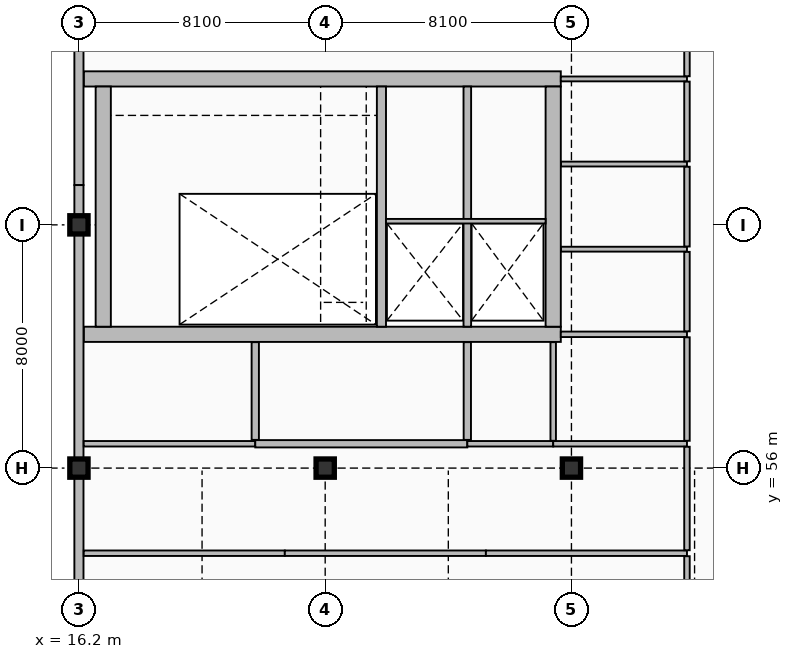
"""IFC4 building model, lengths in metres.
Left out: names, types, materials, properties, quantities, classifications, styles, units other than length and angle.
Written with IfcOpenShell. Run it as: python <this file> out.ifc"""

import sys

from ifc_helpers import new_model, si_unit, direction, frame, frame_2d, origin, origin_2d, place, context, subcontext, project, spatial, rectangle, extrude, element, fill, save


model = new_model("IFC4")
c1 = context("Model", 3, precision=1e-05, world=origin(), true_north=direction((0.0, 1.0)))
c2 = subcontext(c1, "Body", "Model", "MODEL_VIEW")
j1 = project(units=[si_unit("LENGTHUNIT", "METRE"), si_unit("PLANEANGLEUNIT", "RADIAN")], contexts=[c1])
p1 = place(None, origin())
s1 = spatial("IfcSite", under=j1, at=p1, CompositionType="ELEMENT")
p2 = place(p1, origin())
s2 = spatial("IfcBuilding", under=s1, at=p2, CompositionType="ELEMENT")
p3 = place(p2, frame((0.0, 0.0, 19.8)))
s3 = spatial("IfcBuildingStorey", under=s2, at=p3, CompositionType="ELEMENT", Elevation=19.8)
p4 = place(p3, frame((16.36, 60.4, 0.0), z_axis=(0.0, 0.0, 1.0), x_axis=(1.0, 0.0, 0.0)))
e1 = element("IfcWall", 1, at=p4, inside=s3, PredefinedType="SHEAR", context=c2, shape_type="SweptSolid", body=[
    extrude(rectangle(XDim=15.69, YDim=0.5, at=frame_2d((7.845, 0.0))), origin(), (0.0, 0.0, 1.0), 5.1),
])
p5 = place(p4, frame((1.39, 0.0, 0.0)))
e2 = element("IfcOpeningElement", 2, at=p5, cuts=e1, PredefinedType="OPENING", context=c2, shape_type="SweptSolid", body=[
    extrude(rectangle(XDim=1.15, YDim=2.25, at=frame_2d((0.575, 1.125))), frame((0.0, 0.26, 0.0), z_axis=(0.0, -1.0, 0.0), x_axis=(1.0, 0.0, 0.0)), (0.0, 0.0, 1.0), 0.52),
])
p6 = place(p4, frame((10.673, 0.0, 0.0)))
e3 = element("IfcOpeningElement", 3, at=p6, cuts=e1, PredefinedType="OPENING", context=c2, shape_type="SweptSolid", body=[
    extrude(rectangle(XDim=1.1, YDim=2.2, at=frame_2d((0.55, 1.1))), frame((0.0, 0.26, 0.0), z_axis=(0.0, -1.0, 0.0), x_axis=(1.0, 0.0, 0.0)), (0.0, 0.0, 1.0), 0.52),
])
p7 = place(p4, frame((13.387, 0.0, 0.0)))
e4 = element("IfcOpeningElement", 4, at=p7, cuts=e1, PredefinedType="OPENING", context=c2, shape_type="SweptSolid", body=[
    extrude(rectangle(XDim=1.1, YDim=2.2, at=frame_2d((0.55, 1.1))), frame((0.0, 0.26, 0.0), z_axis=(0.0, -1.0, 0.0), x_axis=(1.0, 0.0, 0.0)), (0.0, 0.0, 1.0), 0.52),
])
p8 = place(p3, frame((16.36, 68.8, 0.0), z_axis=(0.0, 0.0, 1.0), x_axis=(1.0, 0.0, 0.0)))
e5 = element("IfcWall", 5, at=p8, inside=s3, PredefinedType="SHEAR", context=c2, shape_type="SweptSolid", body=[
    extrude(rectangle(XDim=15.69, YDim=0.5, at=frame_2d((7.845, 0.0))), origin(), (0.0, 0.0, 1.0), 5.1),
])
for number, where, z_axis, x_axis in (
    (6, (17.0, 60.65, 0.0), (0.0, 0.0, 1.0), (0.0, 1.0, 0.0)),
    (7, (31.8, 60.65, 0.0), (0.0, 0.0, 1.0), (0.0, 1.0, 0.0)),
):
    element("IfcWall", number, at=place(p3, frame(where, z_axis=z_axis, x_axis=x_axis)), inside=s3, PredefinedType="SHEAR", context=c2, shape_type="SweptSolid", body=[
        extrude(rectangle(XDim=7.9, YDim=0.5, at=frame_2d((3.95, 0.0))), origin(), (0.0, 0.0, 1.0), 5.1),
    ])
p9 = place(p3, frame((26.15, 60.65, 0.0), z_axis=(0.0, 0.0, 1.0), x_axis=(0.0, 1.0, 0.0)))
e8 = element("IfcWall", 8, at=p9, inside=s3, PredefinedType="SHEAR", context=c2, shape_type="SweptSolid", body=[
    extrude(rectangle(XDim=7.9, YDim=0.3, at=frame_2d((3.95, 0.0))), origin(), (0.0, 0.0, 1.0), 5.1),
])
p10 = place(p3, frame((28.975, 60.65, 0.0), z_axis=(0.0, 0.0, 1.0), x_axis=(0.0, 1.0, 0.0)))
e9 = element("IfcWall", 9, at=p10, inside=s3, PredefinedType="SHEAR", context=c2, shape_type="SweptSolid", body=[
    extrude(rectangle(XDim=7.9, YDim=0.25, at=frame_2d((3.95, 0.0))), origin(), (0.0, 0.0, 1.0), 5.1),
])
for number, where, z_axis, x_axis in (
    (10, (16.2, 56.0, 0.0), (0.0, 0.0, 1.0), (1.0, 0.0, 0.0)),
    (11, (16.2, 64.0, 0.0), (0.0, 0.0, 1.0), (1.0, 0.0, 0.0)),
    (12, (24.3, 56.0, 0.0), (0.0, 0.0, 1.0), (1.0, 0.0, 0.0)),
    (13, (32.4, 56.0, 0.0), (0.0, 0.0, 1.0), (1.0, 0.0, 0.0)),
):
    element("IfcColumn", number, at=place(p3, frame(where, z_axis=z_axis, x_axis=x_axis)), inside=s3, PredefinedType="COLUMN", context=c2, shape_type="SweptSolid", body=[
        extrude(rectangle(XDim=0.6, YDim=0.6, at=origin_2d()), origin(), (0.0, 0.0, 1.0), 5.1),
    ])
p11 = place(p3, frame((16.2, 80.872, 0.0), z_axis=(0.0, 0.0, 1.0), x_axis=(0.0, -1.0, 0.0)))
e14 = element("IfcWall", 14, at=p11, inside=s3, PredefinedType="SOLIDWALL", context=c2, shape_type="SweptSolid", body=[
    extrude(rectangle(XDim=15.564, YDim=0.3, at=frame_2d((7.782, 0.0))), origin(), (0.0, 0.0, 1.0), 4.352),
])
p12 = place(p11, frame((4.5, 0.0, 0.85)))
e15 = element("IfcOpeningElement", 15, at=p12, cuts=e14, PredefinedType="OPENING", context=c2, shape_type="SweptSolid", body=[
    extrude(rectangle(XDim=1.35, YDim=2.1, at=frame_2d((0.675, 1.05))), frame((0.0, 0.16, 0.0), z_axis=(0.0, -1.0, 0.0), x_axis=(1.0, 0.0, 0.0)), (0.0, 0.0, 1.0), 0.32),
])
p13 = place(p3, frame((16.2, 65.308, 0.0), z_axis=(0.0, 0.0, 1.0), x_axis=(0.0, -1.0, 0.0)))
e16 = element("IfcWall", 16, at=p13, inside=s3, PredefinedType="SOLIDWALL", context=c2, shape_type="SweptSolid", body=[
    extrude(rectangle(XDim=15.564, YDim=0.3, at=frame_2d((7.782, 0.0))), origin(), (0.0, 0.0, 1.0), 4.289),
])
p14 = place(p3, frame((26.3, 64.12, 0.0), z_axis=(0.0, 0.0, 1.0), x_axis=(1.0, 0.0, 0.0)))
e17 = element("IfcWall", 17, at=p14, inside=s3, PredefinedType="PARTITIONING", context=c2, shape_type="SweptSolid", body=[
    extrude(rectangle(XDim=5.25, YDim=0.15, at=frame_2d((2.625, 0.0))), origin(), (0.0, 0.0, 1.0), 4.86),
])
for number, where, z_axis, x_axis in (
    (18, (16.358, 53.2, 0.0), (0.0, 0.0, 1.0), (1.0, 0.0, 0.0)),
    (19, (22.972, 53.2, 0.0), (0.0, 0.0, 1.0), (1.0, 0.0, 0.0)),
    (20, (29.586, 53.2, 0.0), (0.0, 0.0, 1.0), (1.0, 0.0, 0.0)),
):
    element("IfcWall", number, at=place(p3, frame(where, z_axis=z_axis, x_axis=x_axis)), inside=s3, PredefinedType="PARTITIONING", context=c2, shape_type="SweptSolid", body=[
        extrude(rectangle(XDim=6.614, YDim=0.18, at=frame_2d((3.307, 0.0))), origin(), (0.0, 0.0, 1.0), 4.86),
    ])
p15 = place(p3, frame((16.358, 56.8, 0.0), z_axis=(0.0, 0.0, 1.0), x_axis=(1.0, 0.0, 0.0)))
e21 = element("IfcWall", 21, at=p15, inside=s3, PredefinedType="PARTITIONING", context=c2, shape_type="SweptSolid", body=[
    extrude(rectangle(XDim=5.642, YDim=0.18, at=frame_2d((2.821, 0.0))), origin(), (0.0, 0.0, 1.0), 4.86),
])
p16 = place(p15, frame((2.271, 0.0, 0.0)))
e22 = element("IfcOpeningElement", 22, at=p16, cuts=e21, PredefinedType="OPENING", context=c2, shape_type="SweptSolid", body=[
    extrude(rectangle(XDim=1.1, YDim=2.2, at=frame_2d((0.55, 1.1))), frame((0.0, 0.1, 0.0), z_axis=(0.0, -1.0, 0.0), x_axis=(1.0, 0.0, 0.0)), (0.0, 0.0, 1.0), 0.2),
])
p17 = place(p3, frame((22.0, 56.8, 0.0), z_axis=(0.0, 0.0, 1.0), x_axis=(1.0, 0.0, 0.0)))
e23 = element("IfcWall", 23, at=p17, inside=s3, PredefinedType="PARTITIONING", context=c2, shape_type="SweptSolid", body=[
    extrude(rectangle(XDim=6.975, YDim=0.24, at=frame_2d((3.488, 0.0))), origin(), (0.0, 0.0, 1.0), 4.86),
])
p18 = place(p17, frame((4.003, 0.0, 0.0)))
e24 = element("IfcOpeningElement", 24, at=p18, cuts=e23, PredefinedType="OPENING", context=c2, shape_type="SweptSolid", body=[
    extrude(rectangle(XDim=1.2, YDim=2.3, at=frame_2d((0.6, 1.15))), frame((0.0, 0.13, 0.0), z_axis=(0.0, -1.0, 0.0), x_axis=(1.0, 0.0, 0.0)), (0.0, 0.0, 1.0), 0.26),
])
p19 = place(p3, frame((28.975, 56.8, 0.0), z_axis=(0.0, 0.0, 1.0), x_axis=(1.0, 0.0, 0.0)))
e25 = element("IfcWall", 25, at=p19, inside=s3, PredefinedType="PARTITIONING", context=c2, shape_type="SweptSolid", body=[
    extrude(rectangle(XDim=2.825, YDim=0.18, at=frame_2d((1.413, 0.0))), origin(), (0.0, 0.0, 1.0), 4.86),
])
p20 = place(p19, frame((0.636, 0.0, 0.0)))
e26 = element("IfcOpeningElement", 26, at=p20, cuts=e25, PredefinedType="OPENING", context=c2, shape_type="SweptSolid", body=[
    extrude(rectangle(XDim=1.1, YDim=2.2, at=frame_2d((0.55, 1.1))), frame((0.0, 0.1, 0.0), z_axis=(0.0, -1.0, 0.0), x_axis=(1.0, 0.0, 0.0)), (0.0, 0.0, 1.0), 0.2),
])
p21 = place(p3, frame((31.8, 56.8, 0.0), z_axis=(0.0, 0.0, 1.0), x_axis=(1.0, 0.0, 0.0)))
e27 = element("IfcWall", 27, at=p21, inside=s3, PredefinedType="PARTITIONING", context=c2, shape_type="SweptSolid", body=[
    extrude(rectangle(XDim=4.4, YDim=0.18, at=frame_2d((2.2, 0.0))), origin(), (0.0, 0.0, 1.0), 4.86),
])
p22 = place(p3, frame((32.05, 60.4, 0.0), z_axis=(0.0, 0.0, 1.0), x_axis=(1.0, 0.0, 0.0)))
e28 = element("IfcWall", 28, at=p22, inside=s3, PredefinedType="PARTITIONING", context=c2, shape_type="SweptSolid", body=[
    extrude(rectangle(XDim=4.15, YDim=0.18, at=frame_2d((2.075, 0.0))), origin(), (0.0, 0.0, 1.0), 4.86),
])
for number, where, z_axis, x_axis in (
    (29, (32.058, 63.2, 0.0), (0.0, 0.0, 1.0), (1.0, 0.0, 0.0)),
    (30, (32.058, 66.0, 0.0), (0.0, 0.0, 1.0), (1.0, 0.0, 0.0)),
):
    element("IfcWall", number, at=place(p3, frame(where, z_axis=z_axis, x_axis=x_axis)), inside=s3, PredefinedType="PARTITIONING", context=c2, shape_type="SweptSolid", body=[
        extrude(rectangle(XDim=4.142, YDim=0.16, at=frame_2d((2.071, 0.0))), origin(), (0.0, 0.0, 1.0), 4.86),
    ])
p23 = place(p3, frame((32.05, 68.8, 0.0), z_axis=(0.0, 0.0, 1.0), x_axis=(1.0, 0.0, 0.0)))
e31 = element("IfcWall", 31, at=p23, inside=s3, PredefinedType="PARTITIONING", context=c2, shape_type="SweptSolid", body=[
    extrude(rectangle(XDim=4.15, YDim=0.16, at=frame_2d((2.075, 0.0))), origin(), (0.0, 0.0, 1.0), 4.86),
])
p24 = place(p3, frame((22.0, 56.928, 0.0), z_axis=(0.0, 0.0, 1.0), x_axis=(0.0, 1.0, 0.0)))
e32 = element("IfcWall", 32, at=p24, inside=s3, PredefinedType="PARTITIONING", context=c2, shape_type="SweptSolid", body=[
    extrude(rectangle(XDim=3.214, YDim=0.24, at=frame_2d((1.607, 0.0))), origin(), (0.0, 0.0, 1.0), 4.86),
])
p25 = place(p24, frame((1.107, 0.0, 0.0)))
e33 = element("IfcOpeningElement", 33, at=p25, cuts=e32, PredefinedType="OPENING", context=c2, shape_type="SweptSolid", body=[
    extrude(rectangle(XDim=1.0, YDim=2.2, at=frame_2d((0.5, 1.1))), frame((0.0, 0.13, 0.0), z_axis=(0.0, -1.0, 0.0), x_axis=(1.0, 0.0, 0.0)), (0.0, 0.0, 1.0), 0.26),
])
p26 = place(p3, frame((28.975, 56.928, 0.0), z_axis=(0.0, 0.0, 1.0), x_axis=(0.0, 1.0, 0.0)))
e34 = element("IfcWall", 34, at=p26, inside=s3, PredefinedType="PARTITIONING", context=c2, shape_type="SweptSolid", body=[
    extrude(rectangle(XDim=3.214, YDim=0.24, at=frame_2d((1.607, 0.0))), origin(), (0.0, 0.0, 1.0), 4.86),
])
p27 = place(p3, frame((31.8, 56.898, 0.0), z_axis=(0.0, 0.0, 1.0), x_axis=(0.0, 1.0, 0.0)))
e35 = element("IfcWall", 35, at=p27, inside=s3, PredefinedType="PARTITIONING", context=c2, shape_type="SweptSolid", body=[
    extrude(rectangle(XDim=3.244, YDim=0.18, at=frame_2d((1.622, 0.0))), origin(), (0.0, 0.0, 1.0), 4.86),
])
p28 = place(p3, frame((36.2, 34.098, 0.0), z_axis=(0.0, 0.0, 1.0), x_axis=(0.0, 1.0, 0.0)))
e36 = element("IfcWall", 36, at=p28, inside=s3, PredefinedType="PARTITIONING", context=c2, shape_type="SweptSolid", body=[
    extrude(rectangle(XDim=19.004, YDim=0.18, at=frame_2d((9.502, 0.0))), origin(), (0.0, 0.0, 1.0), 4.405),
])
p29 = place(p28, frame((9.002, 0.0, 0.0)))
e37 = element("IfcOpeningElement", 37, at=p29, cuts=e36, PredefinedType="OPENING", context=c2, shape_type="SweptSolid", body=[
    extrude(rectangle(XDim=1.0, YDim=2.2, at=frame_2d((0.5, 1.1))), frame((0.0, 0.1, 0.0), z_axis=(0.0, -1.0, 0.0), x_axis=(1.0, 0.0, 0.0)), (0.0, 0.0, 1.0), 0.2),
])
p30 = place(p3, frame((36.2, 53.298, 0.0), z_axis=(0.0, 0.0, 1.0), x_axis=(0.0, 1.0, 0.0)))
e38 = element("IfcWall", 38, at=p30, inside=s3, PredefinedType="PARTITIONING", context=c2, shape_type="SweptSolid", body=[
    extrude(rectangle(XDim=3.404, YDim=0.18, at=frame_2d((1.702, 0.0))), origin(), (0.0, 0.0, 1.0), 4.405),
])
p31 = place(p30, frame((1.152, 0.0, 0.0)))
e39 = element("IfcOpeningElement", 39, at=p31, cuts=e38, PredefinedType="OPENING", context=c2, shape_type="SweptSolid", body=[
    extrude(rectangle(XDim=1.1, YDim=2.2, at=frame_2d((0.55, 1.1))), frame((0.0, 0.1, 0.0), z_axis=(0.0, -1.0, 0.0), x_axis=(1.0, 0.0, 0.0)), (0.0, 0.0, 1.0), 0.2),
])
p32 = place(p3, frame((36.2, 56.898, 0.0), z_axis=(0.0, 0.0, 1.0), x_axis=(0.0, 1.0, 0.0)))
e40 = element("IfcWall", 40, at=p32, inside=s3, PredefinedType="PARTITIONING", context=c2, shape_type="SweptSolid", body=[
    extrude(rectangle(XDim=3.404, YDim=0.18, at=frame_2d((1.702, 0.0))), origin(), (0.0, 0.0, 1.0), 4.86),
])
p33 = place(p32, frame((1.202, 0.0, 0.0)))
e41 = element("IfcOpeningElement", 41, at=p33, cuts=e40, PredefinedType="OPENING", context=c2, shape_type="SweptSolid", body=[
    extrude(rectangle(XDim=1.0, YDim=2.15, at=frame_2d((0.5, 1.075))), frame((0.0, 0.1, 0.0), z_axis=(0.0, -1.0, 0.0), x_axis=(1.0, 0.0, 0.0)), (0.0, 0.0, 1.0), 0.2),
])
p34 = place(p3, frame((36.2, 60.498, 0.0), z_axis=(0.0, 0.0, 1.0), x_axis=(0.0, 1.0, 0.0)))
e42 = element("IfcWall", 42, at=p34, inside=s3, PredefinedType="PARTITIONING", context=c2, shape_type="SweptSolid", body=[
    extrude(rectangle(XDim=2.614, YDim=0.18, at=frame_2d((1.307, 0.0))), origin(), (0.0, 0.0, 1.0), 4.86),
])
p35 = place(p34, frame((0.832, 0.0, 0.0)))
e43 = element("IfcOpeningElement", 43, at=p35, cuts=e42, PredefinedType="OPENING", context=c2, shape_type="SweptSolid", body=[
    extrude(rectangle(XDim=0.95, YDim=2.1, at=frame_2d((0.475, 1.05))), frame((0.0, 0.1, 0.0), z_axis=(0.0, -1.0, 0.0), x_axis=(1.0, 0.0, 0.0)), (0.0, 0.0, 1.0), 0.2),
])
p36 = place(p3, frame((36.2, 63.288, 0.0), z_axis=(0.0, 0.0, 1.0), x_axis=(0.0, 1.0, 0.0)))
e44 = element("IfcWall", 44, at=p36, inside=s3, PredefinedType="PARTITIONING", context=c2, shape_type="SweptSolid", body=[
    extrude(rectangle(XDim=2.624, YDim=0.18, at=frame_2d((1.312, 0.0))), origin(), (0.0, 0.0, 1.0), 4.86),
])
p37 = place(p36, frame((0.837, 0.0, 0.0)))
e45 = element("IfcOpeningElement", 45, at=p37, cuts=e44, PredefinedType="OPENING", context=c2, shape_type="SweptSolid", body=[
    extrude(rectangle(XDim=0.95, YDim=2.1, at=frame_2d((0.475, 1.05))), frame((0.0, 0.1, 0.0), z_axis=(0.0, -1.0, 0.0), x_axis=(1.0, 0.0, 0.0)), (0.0, 0.0, 1.0), 0.2),
])
p38 = place(p3, frame((36.2, 66.088, 0.0), z_axis=(0.0, 0.0, 1.0), x_axis=(0.0, 1.0, 0.0)))
e46 = element("IfcWall", 46, at=p38, inside=s3, PredefinedType="PARTITIONING", context=c2, shape_type="SweptSolid", body=[
    extrude(rectangle(XDim=2.624, YDim=0.18, at=frame_2d((1.312, 0.0))), origin(), (0.0, 0.0, 1.0), 4.86),
])
p39 = place(p38, frame((0.812, 0.0, 0.0)))
e47 = element("IfcOpeningElement", 47, at=p39, cuts=e46, PredefinedType="OPENING", context=c2, shape_type="SweptSolid", body=[
    extrude(rectangle(XDim=1.0, YDim=2.15, at=frame_2d((0.5, 1.075))), frame((0.0, 0.1, 0.0), z_axis=(0.0, -1.0, 0.0), x_axis=(1.0, 0.0, 0.0)), (0.0, 0.0, 1.0), 0.2),
])
p40 = place(p3, frame((36.2, 68.888, 0.0), z_axis=(0.0, 0.0, 1.0), x_axis=(0.0, 1.0, 0.0)))
e48 = element("IfcWall", 48, at=p40, inside=s3, PredefinedType="PARTITIONING", context=c2, shape_type="SweptSolid", body=[
    extrude(rectangle(XDim=14.034, YDim=0.18, at=frame_2d((7.017, 0.0))), origin(), (0.0, 0.0, 1.0), 4.445),
])
p41 = place(p40, frame((6.517, 0.0, 0.0)))
e49 = element("IfcOpeningElement", 49, at=p41, cuts=e48, PredefinedType="OPENING", context=c2, shape_type="SweptSolid", body=[
    extrude(rectangle(XDim=1.0, YDim=2.2, at=frame_2d((0.5, 1.1))), frame((0.0, 0.1, 0.0), z_axis=(0.0, -1.0, 0.0), x_axis=(1.0, 0.0, 0.0)), (0.0, 0.0, 1.0), 0.2),
])
p42 = place(p5, origin())
e50 = element("IfcDoor", 50, at=p42, inside=s3, OperationType="SINGLE_SWING_RIGHT", PredefinedType="DOOR", context=c2, shape_type="SweptSolid", body=[
    extrude(rectangle(XDim=1.15, YDim=2.25, at=frame_2d((0.575, 1.125))), frame((0.0, 0.025, 0.0), z_axis=(0.0, -1.0, 0.0), x_axis=(1.0, 0.0, 0.0)), (0.0, 0.0, 1.0), 0.05),
])
fill(e2, e50)
p43 = place(p6, frame((1.1, 0.0, 0.0), z_axis=(0.0, 0.0, 1.0), x_axis=(-1.0, 0.0, 0.0)))
e51 = element("IfcDoor", 51, at=p43, inside=s3, OperationType="DOUBLE_DOOR_SLIDING", PredefinedType="DOOR", context=c2, shape_type="SweptSolid", body=[
    extrude(rectangle(XDim=1.1, YDim=2.2, at=frame_2d((0.55, 1.1))), frame((0.0, 0.025, 0.0), z_axis=(0.0, -1.0, 0.0), x_axis=(1.0, 0.0, 0.0)), (0.0, 0.0, 1.0), 0.05),
])
fill(e3, e51)
p44 = place(p7, frame((1.1, 0.0, 0.0), z_axis=(0.0, 0.0, 1.0), x_axis=(-1.0, 0.0, 0.0)))
e52 = element("IfcDoor", 52, at=p44, inside=s3, OperationType="DOUBLE_DOOR_SLIDING", PredefinedType="DOOR", context=c2, shape_type="SweptSolid", body=[
    extrude(rectangle(XDim=1.1, YDim=2.2, at=frame_2d((0.55, 1.1))), frame((0.0, 0.025, 0.0), z_axis=(0.0, -1.0, 0.0), x_axis=(1.0, 0.0, 0.0)), (0.0, 0.0, 1.0), 0.05),
])
fill(e4, e52)
p45 = place(p16, frame((1.1, 0.0, 0.0), z_axis=(0.0, 0.0, 1.0), x_axis=(-1.0, 0.0, 0.0)))
e53 = element("IfcDoor", 53, at=p45, inside=s3, OperationType="SINGLE_SWING_RIGHT", PredefinedType="DOOR", context=c2, shape_type="SweptSolid", body=[
    extrude(rectangle(XDim=1.1, YDim=2.2, at=frame_2d((0.55, 1.1))), frame((0.0, 0.025, 0.0), z_axis=(0.0, -1.0, 0.0), x_axis=(1.0, 0.0, 0.0)), (0.0, 0.0, 1.0), 0.05),
])
fill(e22, e53)
p46 = place(p18, frame((1.2, 0.0, 0.0), z_axis=(0.0, 0.0, 1.0), x_axis=(-1.0, 0.0, 0.0)))
e54 = element("IfcDoor", 54, at=p46, inside=s3, OperationType="SINGLE_SWING_LEFT", PredefinedType="DOOR", context=c2, shape_type="SweptSolid", body=[
    extrude(rectangle(XDim=1.2, YDim=2.3, at=frame_2d((0.6, 1.15))), frame((0.0, 0.025, 0.0), z_axis=(0.0, -1.0, 0.0), x_axis=(1.0, 0.0, 0.0)), (0.0, 0.0, 1.0), 0.05),
])
fill(e24, e54)
p47 = place(p20, frame((1.1, 0.0, 0.0), z_axis=(0.0, 0.0, 1.0), x_axis=(-1.0, 0.0, 0.0)))
e55 = element("IfcDoor", 55, at=p47, inside=s3, OperationType="SINGLE_SWING_LEFT", PredefinedType="DOOR", context=c2, shape_type="SweptSolid", body=[
    extrude(rectangle(XDim=1.1, YDim=2.2, at=frame_2d((0.55, 1.1))), frame((0.0, 0.025, 0.0), z_axis=(0.0, -1.0, 0.0), x_axis=(1.0, 0.0, 0.0)), (0.0, 0.0, 1.0), 0.05),
])
fill(e26, e55)
p48 = place(p25, origin())
e56 = element("IfcDoor", 56, at=p48, inside=s3, OperationType="SINGLE_SWING_RIGHT", PredefinedType="DOOR", context=c2, shape_type="SweptSolid", body=[
    extrude(rectangle(XDim=1.0, YDim=2.2, at=frame_2d((0.5, 1.1))), frame((0.0, 0.025, 0.0), z_axis=(0.0, -1.0, 0.0), x_axis=(1.0, 0.0, 0.0)), (0.0, 0.0, 1.0), 0.05),
])
fill(e33, e56)
p49 = place(p31, origin())
e57 = element("IfcDoor", 57, at=p49, inside=s3, OperationType="SINGLE_SWING_LEFT", PredefinedType="DOOR", context=c2, shape_type="SweptSolid", body=[
    extrude(rectangle(XDim=1.1, YDim=2.2, at=frame_2d((0.55, 1.1))), frame((0.0, 0.025, 0.0), z_axis=(0.0, -1.0, 0.0), x_axis=(1.0, 0.0, 0.0)), (0.0, 0.0, 1.0), 0.05),
])
fill(e39, e57)
p50 = place(p33, origin())
e58 = element("IfcDoor", 58, at=p50, inside=s3, OperationType="SINGLE_SWING_RIGHT", PredefinedType="DOOR", context=c2, shape_type="SweptSolid", body=[
    extrude(rectangle(XDim=1.0, YDim=2.15, at=frame_2d((0.5, 1.075))), frame((0.0, 0.025, 0.0), z_axis=(0.0, -1.0, 0.0), x_axis=(1.0, 0.0, 0.0)), (0.0, 0.0, 1.0), 0.05),
])
fill(e41, e58)
p51 = place(p35, origin())
e59 = element("IfcDoor", 59, at=p51, inside=s3, OperationType="SINGLE_SWING_LEFT", PredefinedType="DOOR", context=c2, shape_type="SweptSolid", body=[
    extrude(rectangle(XDim=0.95, YDim=2.1, at=frame_2d((0.475, 1.05))), frame((0.0, 0.025, 0.0), z_axis=(0.0, -1.0, 0.0), x_axis=(1.0, 0.0, 0.0)), (0.0, 0.0, 1.0), 0.05),
])
fill(e43, e59)
p52 = place(p37, origin())
e60 = element("IfcDoor", 60, at=p52, inside=s3, OperationType="SINGLE_SWING_RIGHT", PredefinedType="DOOR", context=c2, shape_type="SweptSolid", body=[
    extrude(rectangle(XDim=0.95, YDim=2.1, at=frame_2d((0.475, 1.05))), frame((0.0, 0.025, 0.0), z_axis=(0.0, -1.0, 0.0), x_axis=(1.0, 0.0, 0.0)), (0.0, 0.0, 1.0), 0.05),
])
fill(e45, e60)
p53 = place(p39, origin())
e61 = element("IfcDoor", 61, at=p53, inside=s3, OperationType="SINGLE_SWING_LEFT", PredefinedType="DOOR", context=c2, shape_type="SweptSolid", body=[
    extrude(rectangle(XDim=1.0, YDim=2.15, at=frame_2d((0.5, 1.075))), frame((0.0, 0.025, 0.0), z_axis=(0.0, -1.0, 0.0), x_axis=(1.0, 0.0, 0.0)), (0.0, 0.0, 1.0), 0.05),
])
fill(e47, e61)
save(model, sys.argv[1])
